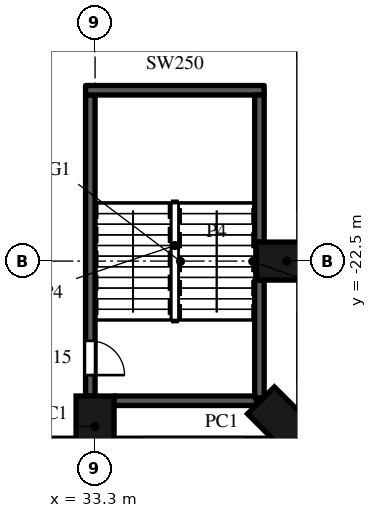
"""IFC4 building model, lengths in metres.
Left out: names, types, materials, properties, quantities, classifications, styles, units other than length and angle.
Written with IfcOpenShell. Run it as: python <this file> out.ifc"""

import sys

from ifc_helpers import new_model, si_unit, direction, frame, frame_2d, origin, origin_2d, place, context, subcontext, project, spatial, rectangle, extrude, element, fill, save


model = new_model("IFC4")
c1 = context("Model", 3, precision=1e-05, world=origin(), true_north=direction((0.0, 1.0)))
c2 = subcontext(c1, "Body", "Model", "MODEL_VIEW")
j1 = project(units=[si_unit("LENGTHUNIT", "METRE"), si_unit("PLANEANGLEUNIT", "RADIAN")], contexts=[c1])
p1 = place(None, origin())
s1 = spatial("IfcSite", under=j1, at=p1, CompositionType="ELEMENT")
p2 = place(p1, origin())
s2 = spatial("IfcBuilding", under=s1, at=p2, CompositionType="ELEMENT")
p3 = place(p2, frame((0.0, 0.0, 36.0)))
s3 = spatial("IfcBuildingStorey", under=s2, at=p3, CompositionType="ELEMENT", Elevation=36.0)
for number, where, z_axis, x_axis in (
    (1, (33.3, -26.85, 0.0), (0.0, 0.0, 1.0), (1.0, 0.0, 0.0)),
    (2, (38.231, -26.731, 0.0), (0.0, 0.0, 1.0), (0.707, 0.707, 0.0)),
    (3, (38.35, -22.5, 0.0), (0.0, 0.0, 1.0), (0.0, 1.0, 0.0)),
):
    element("IfcColumn", number, at=place(p3, frame(where, z_axis=z_axis, x_axis=x_axis)), inside=s3, PredefinedType="COLUMN", context=c2, shape_type="SweptSolid", body=[
        extrude(rectangle(XDim=1.0, YDim=1.6, at=origin_2d()), origin(), (0.0, 0.0, 1.0), 8.0),
    ])
p4 = place(p3, frame((24.8, -27.425, 0.0), z_axis=(0.0, 0.0, 1.0), x_axis=(1.0, 0.0, 0.0)))
e4 = element("IfcWall", 4, at=p4, inside=s3, PredefinedType="ELEMENTEDWALL", context=c2, shape_type="SweptSolid", body=[
    extrude(rectangle(XDim=8.0, YDim=0.6, at=frame_2d((4.0, 0.0))), origin(), (0.0, 0.0, 1.0), 7.6),
])
p5 = place(p4, frame((0.8, 0.0, 1.5)))
e5 = element("IfcOpeningElement", 5, at=p5, cuts=e4, PredefinedType="OPENING", context=c2, shape_type="SweptSolid", body=[
    extrude(rectangle(XDim=2.4, YDim=2.4, at=frame_2d((1.2, 1.2))), frame((0.0, 0.31, 0.0), z_axis=(0.0, -1.0, 0.0), x_axis=(1.0, 0.0, 0.0)), (0.0, 0.0, 1.0), 0.62),
])
p6 = place(p4, frame((4.8, 0.0, 1.5)))
e6 = element("IfcOpeningElement", 6, at=p6, cuts=e4, PredefinedType="OPENING", context=c2, shape_type="SweptSolid", body=[
    extrude(rectangle(XDim=2.4, YDim=2.4, at=frame_2d((1.2, 1.2))), frame((0.0, 0.31, 0.0), z_axis=(0.0, -1.0, 0.0), x_axis=(1.0, 0.0, 0.0)), (0.0, 0.0, 1.0), 0.62),
])
p7 = place(p3, frame((33.8, -27.425, 0.0), z_axis=(0.0, 0.0, 1.0), x_axis=(1.0, 0.0, 0.0)))
e7 = element("IfcWall", 7, at=p7, inside=s3, PredefinedType="ELEMENTEDWALL", context=c2, shape_type="SweptSolid", body=[
    extrude(rectangle(XDim=4.193, YDim=0.6, at=frame_2d((2.096, 0.0))), origin(), (0.0, 0.0, 1.0), 7.6),
])
p8 = place(p7, frame((0.746, 0.0, 1.5)))
e8 = element("IfcOpeningElement", 8, at=p8, cuts=e7, PredefinedType="OPENING", context=c2, shape_type="SweptSolid", body=[
    extrude(rectangle(XDim=2.7, YDim=2.4, at=frame_2d((1.35, 1.2))), frame((0.0, 0.31, 0.0), z_axis=(0.0, -1.0, 0.0), x_axis=(1.0, 0.0, 0.0)), (0.0, 0.0, 1.0), 0.62),
])
p9 = place(p3, frame((33.175, -26.05, 0.0), z_axis=(0.0, 0.0, 1.0), x_axis=(0.0, 1.0, 0.0)))
e9 = element("IfcWall", 9, at=p9, inside=s3, PredefinedType="SHEAR", context=c2, shape_type="SweptSolid", body=[
    extrude(rectangle(XDim=7.92, YDim=0.25, at=frame_2d((3.96, 0.0))), origin(), (0.0, 0.0, 1.0), 7.6),
])
p10 = place(p9, frame((0.55, 0.0, 0.0)))
e10 = element("IfcOpeningElement", 10, at=p10, cuts=e9, PredefinedType="OPENING", context=c2, shape_type="SweptSolid", body=[
    extrude(rectangle(XDim=0.9, YDim=2.2, at=frame_2d((0.45, 1.1))), frame((0.0, 0.135, 0.0), z_axis=(0.0, -1.0, 0.0), x_axis=(1.0, 0.0, 0.0)), (0.0, 0.0, 1.0), 0.27),
])
p11 = place(p3, frame((33.8, -26.175, 0.0), z_axis=(0.0, 0.0, 1.0), x_axis=(1.0, 0.0, 0.0)))
e11 = element("IfcWall", 11, at=p11, inside=s3, PredefinedType="SHEAR", context=c2, shape_type="SweptSolid", body=[
    extrude(rectangle(XDim=3.745, YDim=0.25, at=frame_2d((1.873, 0.0))), origin(), (0.0, 0.0, 1.0), 7.6),
])
p12 = place(p3, frame((33.05, -18.005, 0.0), z_axis=(0.0, 0.0, 1.0), x_axis=(1.0, 0.0, 0.0)))
e12 = element("IfcWall", 12, at=p12, inside=s3, PredefinedType="SHEAR", context=c2, shape_type="SweptSolid", body=[
    extrude(rectangle(XDim=4.7, YDim=0.25, at=frame_2d((2.35, 0.0))), origin(), (0.0, 0.0, 1.0), 7.6),
])
p13 = place(p3, frame((37.625, -26.095, 0.0), z_axis=(0.0, 0.0, 1.0), x_axis=(0.0, 1.0, 0.0)))
e13 = element("IfcWall", 13, at=p13, inside=s3, PredefinedType="SHEAR", context=c2, shape_type="SweptSolid", body=[
    extrude(rectangle(XDim=3.095, YDim=0.25, at=frame_2d((1.548, 0.0))), origin(), (0.0, 0.0, 1.0), 7.6),
])
p14 = place(p3, frame((37.625, -22.0, 0.0), z_axis=(0.0, 0.0, 1.0), x_axis=(0.0, 1.0, 0.0)))
e14 = element("IfcWall", 14, at=p14, inside=s3, PredefinedType="SHEAR", context=c2, shape_type="SweptSolid", body=[
    extrude(rectangle(XDim=3.87, YDim=0.25, at=frame_2d((1.935, 0.0))), origin(), (0.0, 0.0, 1.0), 7.6),
])
p15 = place(p10, origin())
e15 = element("IfcDoor", 15, at=p15, inside=s3, OperationType="SINGLE_SWING_RIGHT", PredefinedType="DOOR", context=c2, shape_type="SweptSolid", body=[
    extrude(rectangle(XDim=0.9, YDim=2.2, at=frame_2d((0.45, 1.1))), frame((0.0, 0.025, 0.0), z_axis=(0.0, -1.0, 0.0), x_axis=(1.0, 0.0, 0.0)), (0.0, 0.0, 1.0), 0.05),
])
fill(e10, e15)
save(model, sys.argv[1])
